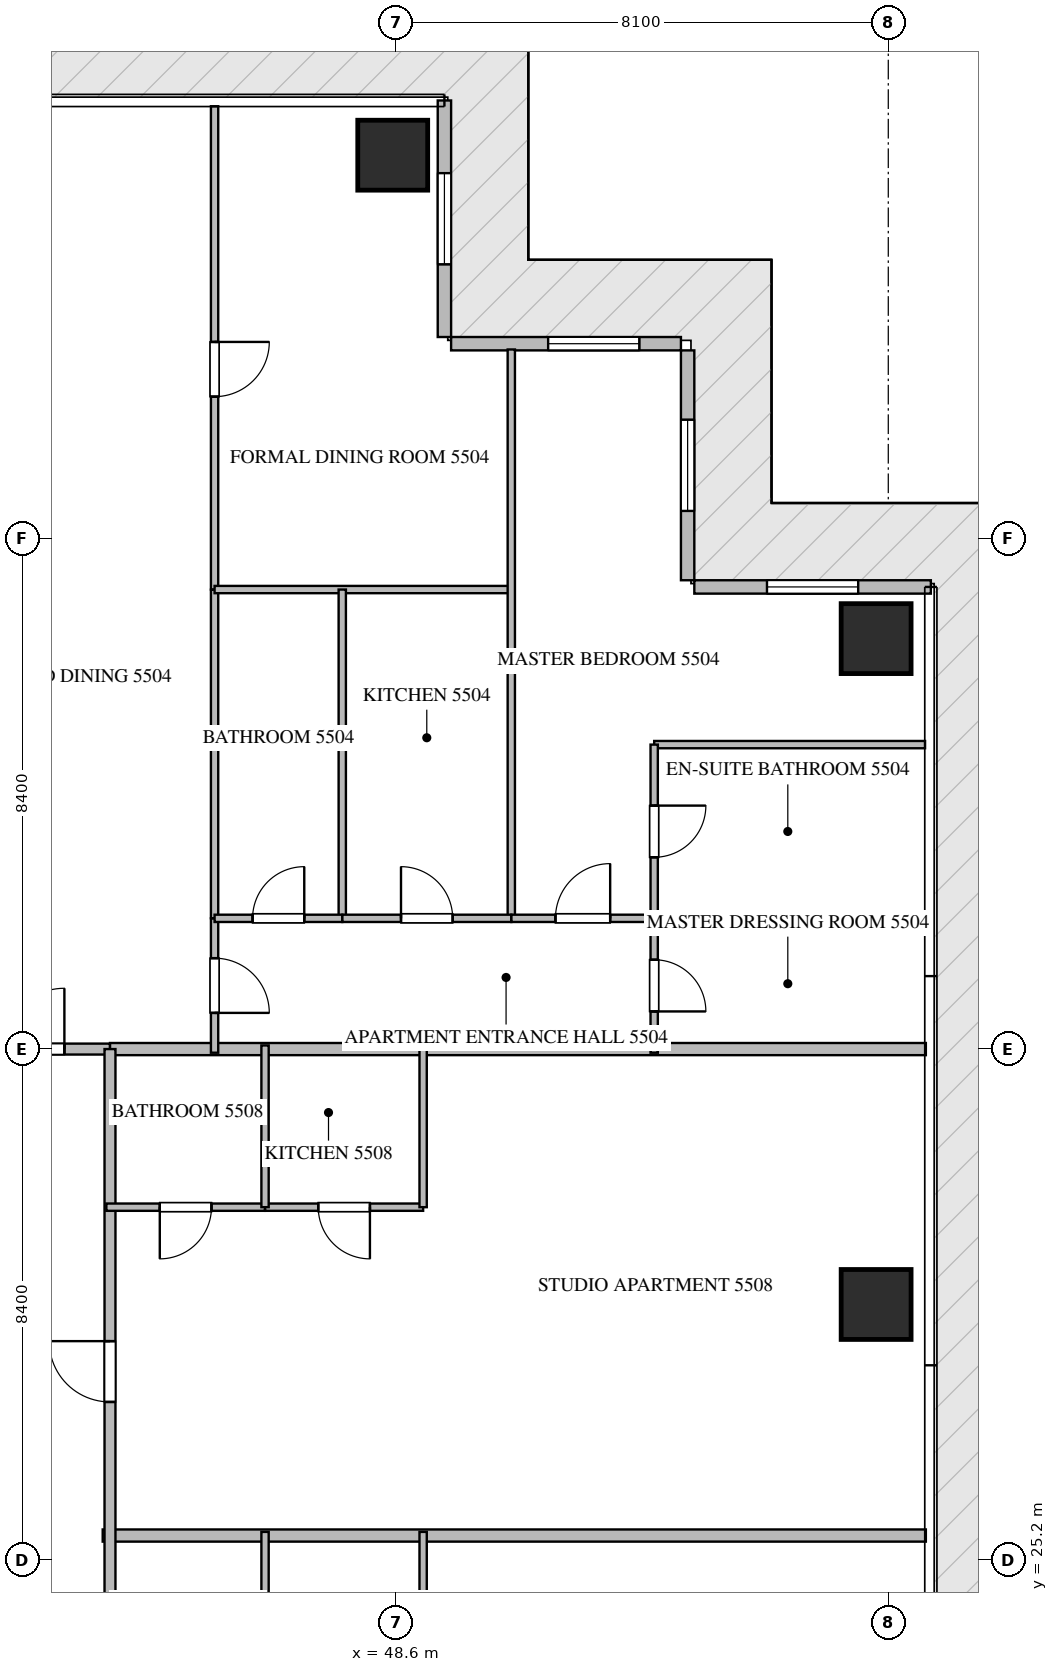
"""IFC4 building model, lengths in metres.
Left out: names, types, materials, properties, quantities, classifications, styles, units other than length and angle.
Written with IfcOpenShell. Run it as: python <this file> out.ifc"""

import sys

from ifc_helpers import new_model, si_unit, direction, frame, frame_2d, origin, origin_2d, place, context, subcontext, project, spatial, rectangle, extrude, source, transform, mapped, element, fill, save


model = new_model("IFC4")
c1 = context("Model", 3, precision=1e-05, world=origin(), true_north=direction((0.0, 1.0)))
c2 = subcontext(c1, "Body", "Model", "MODEL_VIEW")
j1 = project(units=[si_unit("LENGTHUNIT", "METRE"), si_unit("PLANEANGLEUNIT", "RADIAN")], contexts=[c1])
p1 = place(None, origin())
s1 = spatial("IfcSite", under=j1, at=p1, CompositionType="ELEMENT")
p2 = place(p1, origin())
s2 = spatial("IfcBuilding", under=s1, at=p2, CompositionType="ELEMENT")
p3 = place(p2, frame((0.0, 0.0, 222.0)))
s3 = spatial("IfcBuildingStorey", under=s2, at=p3, CompositionType="ELEMENT", Elevation=222.0)
m1 = source(origin(), c2, "Body", "SweptSolid", [
    extrude(rectangle(XDim=1.15, YDim=1.15, at=origin_2d()), origin(), (0.0, 0.0, 1.0), 3.85),
])
for number, where, z_axis, x_axis in (
    (1, (48.55, 48.3, -0.26), (0.0, 0.0, 1.0), (1.0, 0.0, 0.0)),
    (2, (56.5, 29.4, -0.26), (0.0, 0.0, 1.0), (1.0, 0.0, 0.0)),
    (3, (56.5, 40.35, -0.26), (0.0, 0.0, 1.0), (1.0, 0.0, 0.0)),
):
    element("IfcColumn", number, at=place(p3, frame(where, z_axis=z_axis, x_axis=x_axis)), inside=s3, PredefinedType="COLUMN", context=c2, shape_type="MappedRepresentation", body=[
        mapped(m1, transform((0.0, 0.0, 0.0), scale=1.0)),
    ])
p4 = place(p3, frame((57.4, 41.2, 0.0), z_axis=(0.0, 0.0, 1.0), x_axis=(-1.0, 0.0, 0.0)))
e4 = element("IfcWall", 4, at=p4, inside=s3, PredefinedType="ELEMENTEDWALL", context=c2, shape_type="SweptSolid", body=[
    extrude(rectangle(XDim=3.89, YDim=0.22, at=frame_2d((1.945, 0.0))), origin(), (0.0, 0.0, 1.0), 3.575),
])
p5 = place(p4, frame((1.195, 0.0, 0.65)))
e5 = element("IfcOpeningElement", 5, at=p5, cuts=e4, PredefinedType="OPENING", context=c2, shape_type="SweptSolid", body=[
    extrude(rectangle(XDim=1.5, YDim=2.25, at=frame_2d((0.75, 1.125))), frame((0.0, 0.12, 0.0), z_axis=(0.0, -1.0, 0.0), x_axis=(1.0, 0.0, 0.0)), (0.0, 0.0, 1.0), 0.24),
])
p6 = place(p3, frame((53.4, 41.31, 0.0), z_axis=(0.0, 0.0, 1.0), x_axis=(0.0, 1.0, 0.0)))
e6 = element("IfcWall", 6, at=p6, inside=s3, PredefinedType="ELEMENTEDWALL", context=c2, shape_type="SweptSolid", body=[
    extrude(rectangle(XDim=3.78, YDim=0.22, at=frame_2d((1.89, 0.0))), origin(), (0.0, 0.0, 1.0), 3.575),
])
p7 = place(p6, frame((1.14, 0.0, 0.65)))
e7 = element("IfcOpeningElement", 7, at=p7, cuts=e6, PredefinedType="OPENING", context=c2, shape_type="SweptSolid", body=[
    extrude(rectangle(XDim=1.5, YDim=2.25, at=frame_2d((0.75, 1.125))), frame((0.0, 0.12, 0.0), z_axis=(0.0, -1.0, 0.0), x_axis=(1.0, 0.0, 0.0)), (0.0, 0.0, 1.0), 0.24),
])
p8 = place(p3, frame((53.29, 45.2, 0.0), z_axis=(0.0, 0.0, 1.0), x_axis=(-1.0, 0.0, 0.0)))
e8 = element("IfcWall", 8, at=p8, inside=s3, PredefinedType="ELEMENTEDWALL", context=c2, shape_type="SweptSolid", body=[
    extrude(rectangle(XDim=3.78, YDim=0.22, at=frame_2d((1.89, 0.0))), origin(), (0.0, 0.0, 1.0), 3.575),
])
p9 = place(p8, frame((0.684, 0.0, 0.65)))
e9 = element("IfcOpeningElement", 9, at=p9, cuts=e8, PredefinedType="OPENING", context=c2, shape_type="SweptSolid", body=[
    extrude(rectangle(XDim=1.5, YDim=2.25, at=frame_2d((0.75, 1.125))), frame((0.0, 0.12, 0.0), z_axis=(0.0, -1.0, 0.0), x_axis=(1.0, 0.0, 0.0)), (0.0, 0.0, 1.0), 0.24),
])
p10 = place(p3, frame((49.4, 45.31, 0.0), z_axis=(0.0, 0.0, 1.0), x_axis=(0.0, 1.0, 0.0)))
e10 = element("IfcWall", 10, at=p10, inside=s3, PredefinedType="ELEMENTEDWALL", context=c2, shape_type="SweptSolid", body=[
    extrude(rectangle(XDim=3.89, YDim=0.22, at=frame_2d((1.945, 0.0))), origin(), (0.0, 0.0, 1.0), 3.575),
])
p11 = place(p10, frame((1.195, 0.0, 0.65)))
e11 = element("IfcOpeningElement", 11, at=p11, cuts=e10, PredefinedType="OPENING", context=c2, shape_type="SweptSolid", body=[
    extrude(rectangle(XDim=1.5, YDim=2.25, at=frame_2d((0.75, 1.125))), frame((0.0, 0.12, 0.0), z_axis=(0.0, -1.0, 0.0), x_axis=(1.0, 0.0, 0.0)), (0.0, 0.0, 1.0), 0.24),
])
p12 = place(p3, frame((43.78, 25.6, 0.0), z_axis=(0.0, 0.0, 1.0), x_axis=(1.0, 0.0, 0.0)))
e12 = element("IfcWall", 12, at=p12, inside=s3, PredefinedType="PARTITIONING", context=c2, shape_type="SweptSolid", body=[
    extrude(rectangle(XDim=13.538, YDim=0.2, at=frame_2d((6.769, 0.0))), origin(), (0.0, 0.0, 1.0), 3.59),
])
p13 = place(p3, frame((43.9, 33.6, 0.0), z_axis=(0.0, 0.0, 1.0), x_axis=(1.0, 0.0, 0.0)))
e13 = element("IfcWall", 13, at=p13, inside=s3, PredefinedType="PARTITIONING", context=c2, shape_type="SweptSolid", body=[
    extrude(rectangle(XDim=13.418, YDim=0.2, at=frame_2d((6.709, 0.0))), origin(), (0.0, 0.0, 1.0), 3.59),
])
p14 = place(p3, frame((41.402, 33.6, 0.0), z_axis=(0.0, 0.0, 1.0), x_axis=(1.0, 0.0, 0.0)))
e14 = element("IfcWall", 14, at=p14, inside=s3, PredefinedType="PARTITIONING", context=c2, shape_type="SweptSolid", body=[
    extrude(rectangle(XDim=2.496, YDim=0.18, at=frame_2d((1.248, 0.0))), origin(), (0.0, 0.0, 1.0), 3.59),
])
p15 = place(p14, frame((0.748, 0.0, 0.0)))
e15 = element("IfcOpeningElement", 15, at=p15, cuts=e14, PredefinedType="OPENING", context=c2, shape_type="SweptSolid", body=[
    extrude(rectangle(XDim=1.0, YDim=2.15, at=frame_2d((0.5, 1.075))), frame((0.0, 0.1, 0.0), z_axis=(0.0, -1.0, 0.0), x_axis=(1.0, 0.0, 0.0)), (0.0, 0.0, 1.0), 0.2),
])
p16 = place(p3, frame((43.9, 16.8, 0.0), z_axis=(0.0, 0.0, 1.0), x_axis=(0.0, 1.0, 0.0)))
e16 = element("IfcWall", 16, at=p16, inside=s3, PredefinedType="PARTITIONING", context=c2, shape_type="SweptSolid", body=[
    extrude(rectangle(XDim=16.8, YDim=0.18, at=frame_2d((8.4, 0.0))), origin(), (0.0, 0.0, 1.0), 3.59),
])
p17 = place(p16, frame((2.575, 0.0, 0.0)))
e17 = element("IfcOpeningElement", 17, at=p17, cuts=e16, PredefinedType="OPENING", context=c2, shape_type="SweptSolid", body=[
    extrude(rectangle(XDim=1.0, YDim=2.15, at=frame_2d((0.5, 1.075))), frame((0.0, 0.1, 0.0), z_axis=(0.0, -1.0, 0.0), x_axis=(1.0, 0.0, 0.0)), (0.0, 0.0, 1.0), 0.2),
])
p18 = place(p16, frame((10.997, 0.0, 0.0)))
e18 = element("IfcOpeningElement", 18, at=p18, cuts=e16, PredefinedType="OPENING", context=c2, shape_type="SweptSolid", body=[
    extrude(rectangle(XDim=1.0, YDim=2.15, at=frame_2d((0.5, 1.075))), frame((0.0, 0.1, 0.0), z_axis=(0.0, -1.0, 0.0), x_axis=(1.0, 0.0, 0.0)), (0.0, 0.0, 1.0), 0.2),
])
p19 = place(p3, frame((45.62, 35.75, 0.0), z_axis=(0.0, 0.0, 1.0), x_axis=(0.0, -1.0, 0.0)))
e19 = element("IfcWall", 19, at=p19, inside=s3, PredefinedType="PARTITIONING", context=c2, shape_type="SweptSolid", body=[
    extrude(rectangle(XDim=2.21, YDim=0.12, at=frame_2d((1.105, 0.0))), origin(), (0.0, 0.0, 1.0), 3.59),
])
p20 = place(p19, frame((0.655, 0.0, 0.0)))
e20 = element("IfcOpeningElement", 20, at=p20, cuts=e19, PredefinedType="OPENING", context=c2, shape_type="SweptSolid", body=[
    extrude(rectangle(XDim=0.9, YDim=2.1, at=frame_2d((0.45, 1.05))), frame((0.0, 0.07, 0.0), z_axis=(0.0, -1.0, 0.0), x_axis=(1.0, 0.0, 0.0)), (0.0, 0.0, 1.0), 0.14),
])
p21 = place(p3, frame((45.62, 49.105, 0.0), z_axis=(0.0, 0.0, 1.0), x_axis=(0.0, -1.0, 0.0)))
e21 = element("IfcWall", 21, at=p21, inside=s3, PredefinedType="PARTITIONING", context=c2, shape_type="SweptSolid", body=[
    extrude(rectangle(XDim=7.948, YDim=0.12, at=frame_2d((3.974, 0.0))), origin(), (0.0, 0.0, 1.0), 3.59),
])
p22 = place(p21, frame((3.876, 0.0, 0.0)))
e22 = element("IfcOpeningElement", 22, at=p22, cuts=e21, PredefinedType="OPENING", context=c2, shape_type="SweptSolid", body=[
    extrude(rectangle(XDim=0.9, YDim=2.1, at=frame_2d((0.45, 1.05))), frame((0.0, 0.07, 0.0), z_axis=(0.0, -1.0, 0.0), x_axis=(1.0, 0.0, 0.0)), (0.0, 0.0, 1.0), 0.14),
])
p23 = place(p3, frame((45.62, 41.155, 0.0), z_axis=(0.0, 0.0, 1.0), x_axis=(0.0, -1.0, 0.0)))
e23 = element("IfcWall", 23, at=p23, inside=s3, PredefinedType="PARTITIONING", context=c2, shape_type="SweptSolid", body=[
    extrude(rectangle(XDim=5.403, YDim=0.12, at=frame_2d((2.702, 0.0))), origin(), (0.0, 0.0, 1.0), 3.59),
])
p24 = place(p3, frame((45.62, 41.157, 0.0), z_axis=(0.0, 0.0, 1.0), x_axis=(1.0, 0.0, 0.0)))
e24 = element("IfcWall", 24, at=p24, inside=s3, PredefinedType="PARTITIONING", context=c2, shape_type="SweptSolid", body=[
    extrude(rectangle(XDim=4.88, YDim=0.12, at=frame_2d((2.44, 0.0))), origin(), (0.0, 0.0, 1.0), 3.59),
])
p25 = place(p3, frame((50.5, 45.105, 0.0), z_axis=(0.0, 0.0, 1.0), x_axis=(0.0, -1.0, 0.0)))
e25 = element("IfcWall", 25, at=p25, inside=s3, PredefinedType="PARTITIONING", context=c2, shape_type="SweptSolid", body=[
    extrude(rectangle(XDim=9.355, YDim=0.12, at=frame_2d((4.677, 0.0))), origin(), (0.0, 0.0, 1.0), 3.59),
])
p26 = place(p3, frame((47.72, 41.157, 0.0), z_axis=(0.0, 0.0, 1.0), x_axis=(0.0, -1.0, 0.0)))
e26 = element("IfcWall", 26, at=p26, inside=s3, PredefinedType="PARTITIONING", context=c2, shape_type="SweptSolid", body=[
    extrude(rectangle(XDim=5.407, YDim=0.12, at=frame_2d((2.704, 0.0))), origin(), (0.0, 0.0, 1.0), 3.59),
])
p27 = place(p3, frame((45.62, 35.75, 0.0), z_axis=(0.0, 0.0, 1.0), x_axis=(1.0, 0.0, 0.0)))
e27 = element("IfcWall", 27, at=p27, inside=s3, PredefinedType="PARTITIONING", context=c2, shape_type="SweptSolid", body=[
    extrude(rectangle(XDim=2.1, YDim=0.12, at=frame_2d((1.05, 0.0))), origin(), (0.0, 0.0, 1.0), 3.59),
])
p28 = place(p27, frame((0.625, 0.0, 0.0)))
e28 = element("IfcOpeningElement", 28, at=p28, cuts=e27, PredefinedType="OPENING", context=c2, shape_type="SweptSolid", body=[
    extrude(rectangle(XDim=0.85, YDim=2.1, at=frame_2d((0.425, 1.05))), frame((0.0, 0.07, 0.0), z_axis=(0.0, -1.0, 0.0), x_axis=(1.0, 0.0, 0.0)), (0.0, 0.0, 1.0), 0.14),
])
p29 = place(p3, frame((47.722, 35.75, 0.0), z_axis=(0.0, 0.0, 1.0), x_axis=(1.0, 0.0, 0.0)))
e29 = element("IfcWall", 29, at=p29, inside=s3, PredefinedType="PARTITIONING", context=c2, shape_type="SweptSolid", body=[
    extrude(rectangle(XDim=2.778, YDim=0.12, at=frame_2d((1.389, 0.0))), origin(), (0.0, 0.0, 1.0), 3.59),
])
p30 = place(p29, frame((0.964, 0.0, 0.0)))
e30 = element("IfcOpeningElement", 30, at=p30, cuts=e29, PredefinedType="OPENING", context=c2, shape_type="SweptSolid", body=[
    extrude(rectangle(XDim=0.85, YDim=2.1, at=frame_2d((0.425, 1.05))), frame((0.0, 0.07, 0.0), z_axis=(0.0, -1.0, 0.0), x_axis=(1.0, 0.0, 0.0)), (0.0, 0.0, 1.0), 0.14),
])
p31 = place(p3, frame((50.502, 35.75, 0.0), z_axis=(0.0, 0.0, 1.0), x_axis=(1.0, 0.0, 0.0)))
e31 = element("IfcWall", 31, at=p31, inside=s3, PredefinedType="PARTITIONING", context=c2, shape_type="SweptSolid", body=[
    extrude(rectangle(XDim=2.348, YDim=0.12, at=frame_2d((1.174, 0.0))), origin(), (0.0, 0.0, 1.0), 3.59),
])
p32 = place(p31, frame((0.724, 0.0, 0.0)))
e32 = element("IfcOpeningElement", 32, at=p32, cuts=e31, PredefinedType="OPENING", context=c2, shape_type="SweptSolid", body=[
    extrude(rectangle(XDim=0.9, YDim=2.1, at=frame_2d((0.45, 1.05))), frame((0.0, 0.07, 0.0), z_axis=(0.0, -1.0, 0.0), x_axis=(1.0, 0.0, 0.0)), (0.0, 0.0, 1.0), 0.14),
])
p33 = place(p3, frame((52.85, 38.607, 0.0), z_axis=(0.0, 0.0, 1.0), x_axis=(1.0, 0.0, 0.0)))
e33 = element("IfcWall", 33, at=p33, inside=s3, PredefinedType="PARTITIONING", context=c2, shape_type="SweptSolid", body=[
    extrude(rectangle(XDim=4.455, YDim=0.12, at=frame_2d((2.228, 0.0))), origin(), (0.0, 0.0, 1.0), 3.59),
])
p34 = place(p3, frame((52.852, 35.75, 0.0), z_axis=(0.0, 0.0, 1.0), x_axis=(1.0, 0.0, 0.0)))
e34 = element("IfcWall", 34, at=p34, inside=s3, PredefinedType="PARTITIONING", context=c2, shape_type="SweptSolid", body=[
    extrude(rectangle(XDim=4.453, YDim=0.12, at=frame_2d((2.227, 0.0))), origin(), (0.0, 0.0, 1.0), 3.59),
])
p35 = place(p3, frame((52.85, 38.607, 0.0), z_axis=(0.0, 0.0, 1.0), x_axis=(0.0, -1.0, 0.0)))
e35 = element("IfcWall", 35, at=p35, inside=s3, PredefinedType="PARTITIONING", context=c2, shape_type="SweptSolid", body=[
    extrude(rectangle(XDim=2.857, YDim=0.12, at=frame_2d((1.428, 0.0))), origin(), (0.0, 0.0, 1.0), 3.59),
])
p36 = place(p35, frame((1.003, 0.0, 0.0)))
e36 = element("IfcOpeningElement", 36, at=p36, cuts=e35, PredefinedType="OPENING", context=c2, shape_type="SweptSolid", body=[
    extrude(rectangle(XDim=0.85, YDim=2.1, at=frame_2d((0.425, 1.05))), frame((0.0, 0.07, 0.0), z_axis=(0.0, -1.0, 0.0), x_axis=(1.0, 0.0, 0.0)), (0.0, 0.0, 1.0), 0.14),
])
p37 = place(p3, frame((52.85, 35.748, 0.0), z_axis=(0.0, 0.0, 1.0), x_axis=(0.0, -1.0, 0.0)))
e37 = element("IfcWall", 37, at=p37, inside=s3, PredefinedType="PARTITIONING", context=c2, shape_type="SweptSolid", body=[
    extrude(rectangle(XDim=2.208, YDim=0.12, at=frame_2d((1.104, 0.0))), origin(), (0.0, 0.0, 1.0), 3.59),
])
p38 = place(p37, frame((0.679, 0.0, 0.0)))
e38 = element("IfcOpeningElement", 38, at=p38, cuts=e37, PredefinedType="OPENING", context=c2, shape_type="SweptSolid", body=[
    extrude(rectangle(XDim=0.85, YDim=2.1, at=frame_2d((0.425, 1.05))), frame((0.0, 0.07, 0.0), z_axis=(0.0, -1.0, 0.0), x_axis=(1.0, 0.0, 0.0)), (0.0, 0.0, 1.0), 0.14),
])
for number, where, z_axis, x_axis in (
    (39, (46.45, 22.85, 0.0), (0.0, 0.0, 1.0), (0.0, 1.0, 0.0)),
    (40, (49.05, 22.85, 0.0), (0.0, 0.0, 1.0), (0.0, 1.0, 0.0)),
):
    element("IfcWall", number, at=place(p3, frame(where, z_axis=z_axis, x_axis=x_axis)), inside=s3, PredefinedType="PARTITIONING", context=c2, shape_type="SweptSolid", body=[
        extrude(rectangle(XDim=2.81, YDim=0.12, at=frame_2d((1.405, 0.0))), origin(), (0.0, 0.0, 1.0), 3.59),
    ])
p39 = place(p3, frame((49.05, 31.0, 0.0), z_axis=(0.0, 0.0, 1.0), x_axis=(-1.0, 0.0, 0.0)))
e41 = element("IfcWall", 41, at=p39, inside=s3, PredefinedType="PARTITIONING", context=c2, shape_type="SweptSolid", body=[
    extrude(rectangle(XDim=2.6, YDim=0.12, at=frame_2d((1.3, 0.0))), origin(), (0.0, 0.0, 1.0), 3.59),
])
p40 = place(p39, frame((0.875, 0.0, 0.0)))
e42 = element("IfcOpeningElement", 42, at=p40, cuts=e41, PredefinedType="OPENING", context=c2, shape_type="SweptSolid", body=[
    extrude(rectangle(XDim=0.85, YDim=2.1, at=frame_2d((0.425, 1.05))), frame((0.0, 0.07, 0.0), z_axis=(0.0, -1.0, 0.0), x_axis=(1.0, 0.0, 0.0)), (0.0, 0.0, 1.0), 0.14),
])
p41 = place(p3, frame((46.448, 31.0, 0.0), z_axis=(0.0, 0.0, 1.0), x_axis=(-1.0, 0.0, 0.0)))
e43 = element("IfcWall", 43, at=p41, inside=s3, PredefinedType="PARTITIONING", context=c2, shape_type="SweptSolid", body=[
    extrude(rectangle(XDim=2.608, YDim=0.12, at=frame_2d((1.304, 0.0))), origin(), (0.0, 0.0, 1.0), 3.59),
])
p42 = place(p41, frame((0.879, 0.0, 0.0)))
e44 = element("IfcOpeningElement", 44, at=p42, cuts=e43, PredefinedType="OPENING", context=c2, shape_type="SweptSolid", body=[
    extrude(rectangle(XDim=0.85, YDim=2.1, at=frame_2d((0.425, 1.05))), frame((0.0, 0.07, 0.0), z_axis=(0.0, -1.0, 0.0), x_axis=(1.0, 0.0, 0.0)), (0.0, 0.0, 1.0), 0.14),
])
for number, where, z_axis, x_axis in (
    (45, (46.45, 31.0, 0.0), (0.0, 0.0, 1.0), (0.0, 1.0, 0.0)),
    (46, (49.05, 31.0, 0.0), (0.0, 0.0, 1.0), (0.0, 1.0, 0.0)),
):
    element("IfcWall", number, at=place(p3, frame(where, z_axis=z_axis, x_axis=x_axis)), inside=s3, PredefinedType="PARTITIONING", context=c2, shape_type="SweptSolid", body=[
        extrude(rectangle(XDim=2.66, YDim=0.12, at=frame_2d((1.33, 0.0))), origin(), (0.0, 0.0, 1.0), 3.59),
    ])
m2 = source(origin(), c2, "Body", "SweptSolid", [
    extrude(rectangle(XDim=1.5, YDim=2.25, at=frame_2d((0.75, 1.125))), frame((0.0, 0.03, 0.0), z_axis=(0.0, -1.0, 0.0), x_axis=(1.0, 0.0, 0.0)), (0.0, 0.0, 1.0), 0.06),
])
p43 = place(p5, origin())
e47 = element("IfcWindow", 47, at=p43, inside=s3, PartitioningType="SINGLE_PANEL", PredefinedType="WINDOW", context=c2, shape_type="MappedRepresentation", body=[
    mapped(m2, transform((0.0, 0.0, 0.0), scale=1.0)),
])
fill(e5, e47)
p44 = place(p7, origin())
e48 = element("IfcWindow", 48, at=p44, inside=s3, PartitioningType="SINGLE_PANEL", PredefinedType="WINDOW", context=c2, shape_type="MappedRepresentation", body=[
    mapped(m2, transform((0.0, 0.0, 0.0), scale=1.0)),
])
fill(e7, e48)
p45 = place(p9, origin())
e49 = element("IfcWindow", 49, at=p45, inside=s3, PartitioningType="SINGLE_PANEL", PredefinedType="WINDOW", context=c2, shape_type="MappedRepresentation", body=[
    mapped(m2, transform((0.0, 0.0, 0.0), scale=1.0)),
])
fill(e9, e49)
p46 = place(p11, origin())
e50 = element("IfcWindow", 50, at=p46, inside=s3, PartitioningType="SINGLE_PANEL", PredefinedType="WINDOW", context=c2, shape_type="MappedRepresentation", body=[
    mapped(m2, transform((0.0, 0.0, 0.0), scale=1.0)),
])
fill(e11, e50)
m3 = source(origin(), c2, "Body", "SweptSolid", [
    extrude(rectangle(XDim=1.0, YDim=2.15, at=frame_2d((0.5, 1.075))), frame((0.0, 0.025, 0.0), z_axis=(0.0, -1.0, 0.0), x_axis=(1.0, 0.0, 0.0)), (0.0, 0.0, 1.0), 0.05),
])
p47 = place(p15, origin())
e51 = element("IfcDoor", 51, at=p47, inside=s3, OperationType="SINGLE_SWING_RIGHT", PredefinedType="DOOR", context=c2, shape_type="MappedRepresentation", body=[
    mapped(m3, transform((0.0, 0.0, 0.0), scale=1.0)),
])
fill(e15, e51)
p48 = place(p18, origin())
e52 = element("IfcDoor", 52, at=p48, inside=s3, OperationType="SINGLE_SWING_RIGHT", PredefinedType="DOOR", context=c2, shape_type="MappedRepresentation", body=[
    mapped(m3, transform((0.0, 0.0, 0.0), scale=1.0)),
])
fill(e18, e52)
m4 = source(origin(), c2, "Body", "SweptSolid", [
    extrude(rectangle(XDim=0.9, YDim=2.1, at=frame_2d((0.45, 1.05))), frame((0.0, 0.025, 0.0), z_axis=(0.0, -1.0, 0.0), x_axis=(1.0, 0.0, 0.0)), (0.0, 0.0, 1.0), 0.05),
])
p49 = place(p20, origin())
e53 = element("IfcDoor", 53, at=p49, inside=s3, OperationType="SINGLE_SWING_RIGHT", PredefinedType="DOOR", context=c2, shape_type="MappedRepresentation", body=[
    mapped(m4, transform((0.0, 0.0, 0.0), scale=1.0)),
])
fill(e20, e53)
p50 = place(p22, origin())
e54 = element("IfcDoor", 54, at=p50, inside=s3, OperationType="SINGLE_SWING_LEFT", PredefinedType="DOOR", context=c2, shape_type="MappedRepresentation", body=[
    mapped(m4, transform((0.0, 0.0, 0.0), scale=1.0)),
])
fill(e22, e54)
m5 = source(origin(), c2, "Body", "SweptSolid", [
    extrude(rectangle(XDim=0.85, YDim=2.1, at=frame_2d((0.425, 1.05))), frame((0.0, 0.025, 0.0), z_axis=(0.0, -1.0, 0.0), x_axis=(1.0, 0.0, 0.0)), (0.0, 0.0, 1.0), 0.05),
])
p51 = place(p28, origin())
e55 = element("IfcDoor", 55, at=p51, inside=s3, OperationType="SINGLE_SWING_RIGHT", PredefinedType="DOOR", context=c2, shape_type="MappedRepresentation", body=[
    mapped(m5, transform((0.0, 0.0, 0.0), scale=1.0)),
])
fill(e28, e55)
p52 = place(p30, origin())
e56 = element("IfcDoor", 56, at=p52, inside=s3, OperationType="SINGLE_SWING_LEFT", PredefinedType="DOOR", context=c2, shape_type="MappedRepresentation", body=[
    mapped(m5, transform((0.0, 0.0, 0.0), scale=1.0)),
])
fill(e30, e56)
p53 = place(p32, origin())
e57 = element("IfcDoor", 57, at=p53, inside=s3, OperationType="SINGLE_SWING_RIGHT", PredefinedType="DOOR", context=c2, shape_type="MappedRepresentation", body=[
    mapped(m4, transform((0.0, 0.0, 0.0), scale=1.0)),
])
fill(e32, e57)
p54 = place(p36, origin())
e58 = element("IfcDoor", 58, at=p54, inside=s3, OperationType="SINGLE_SWING_LEFT", PredefinedType="DOOR", context=c2, shape_type="MappedRepresentation", body=[
    mapped(m5, transform((0.0, 0.0, 0.0), scale=1.0)),
])
fill(e36, e58)
p55 = place(p38, origin())
e59 = element("IfcDoor", 59, at=p55, inside=s3, OperationType="SINGLE_SWING_RIGHT", PredefinedType="DOOR", context=c2, shape_type="MappedRepresentation", body=[
    mapped(m5, transform((0.0, 0.0, 0.0), scale=1.0)),
])
fill(e38, e59)
p56 = place(p40, origin())
e60 = element("IfcDoor", 60, at=p56, inside=s3, OperationType="SINGLE_SWING_LEFT", PredefinedType="DOOR", context=c2, shape_type="MappedRepresentation", body=[
    mapped(m5, transform((0.0, 0.0, 0.0), scale=1.0)),
])
fill(e42, e60)
p57 = place(p42, origin())
e61 = element("IfcDoor", 61, at=p57, inside=s3, OperationType="SINGLE_SWING_RIGHT", PredefinedType="DOOR", context=c2, shape_type="MappedRepresentation", body=[
    mapped(m5, transform((0.0, 0.0, 0.0), scale=1.0)),
])
fill(e44, e61)
save(model, sys.argv[1])
